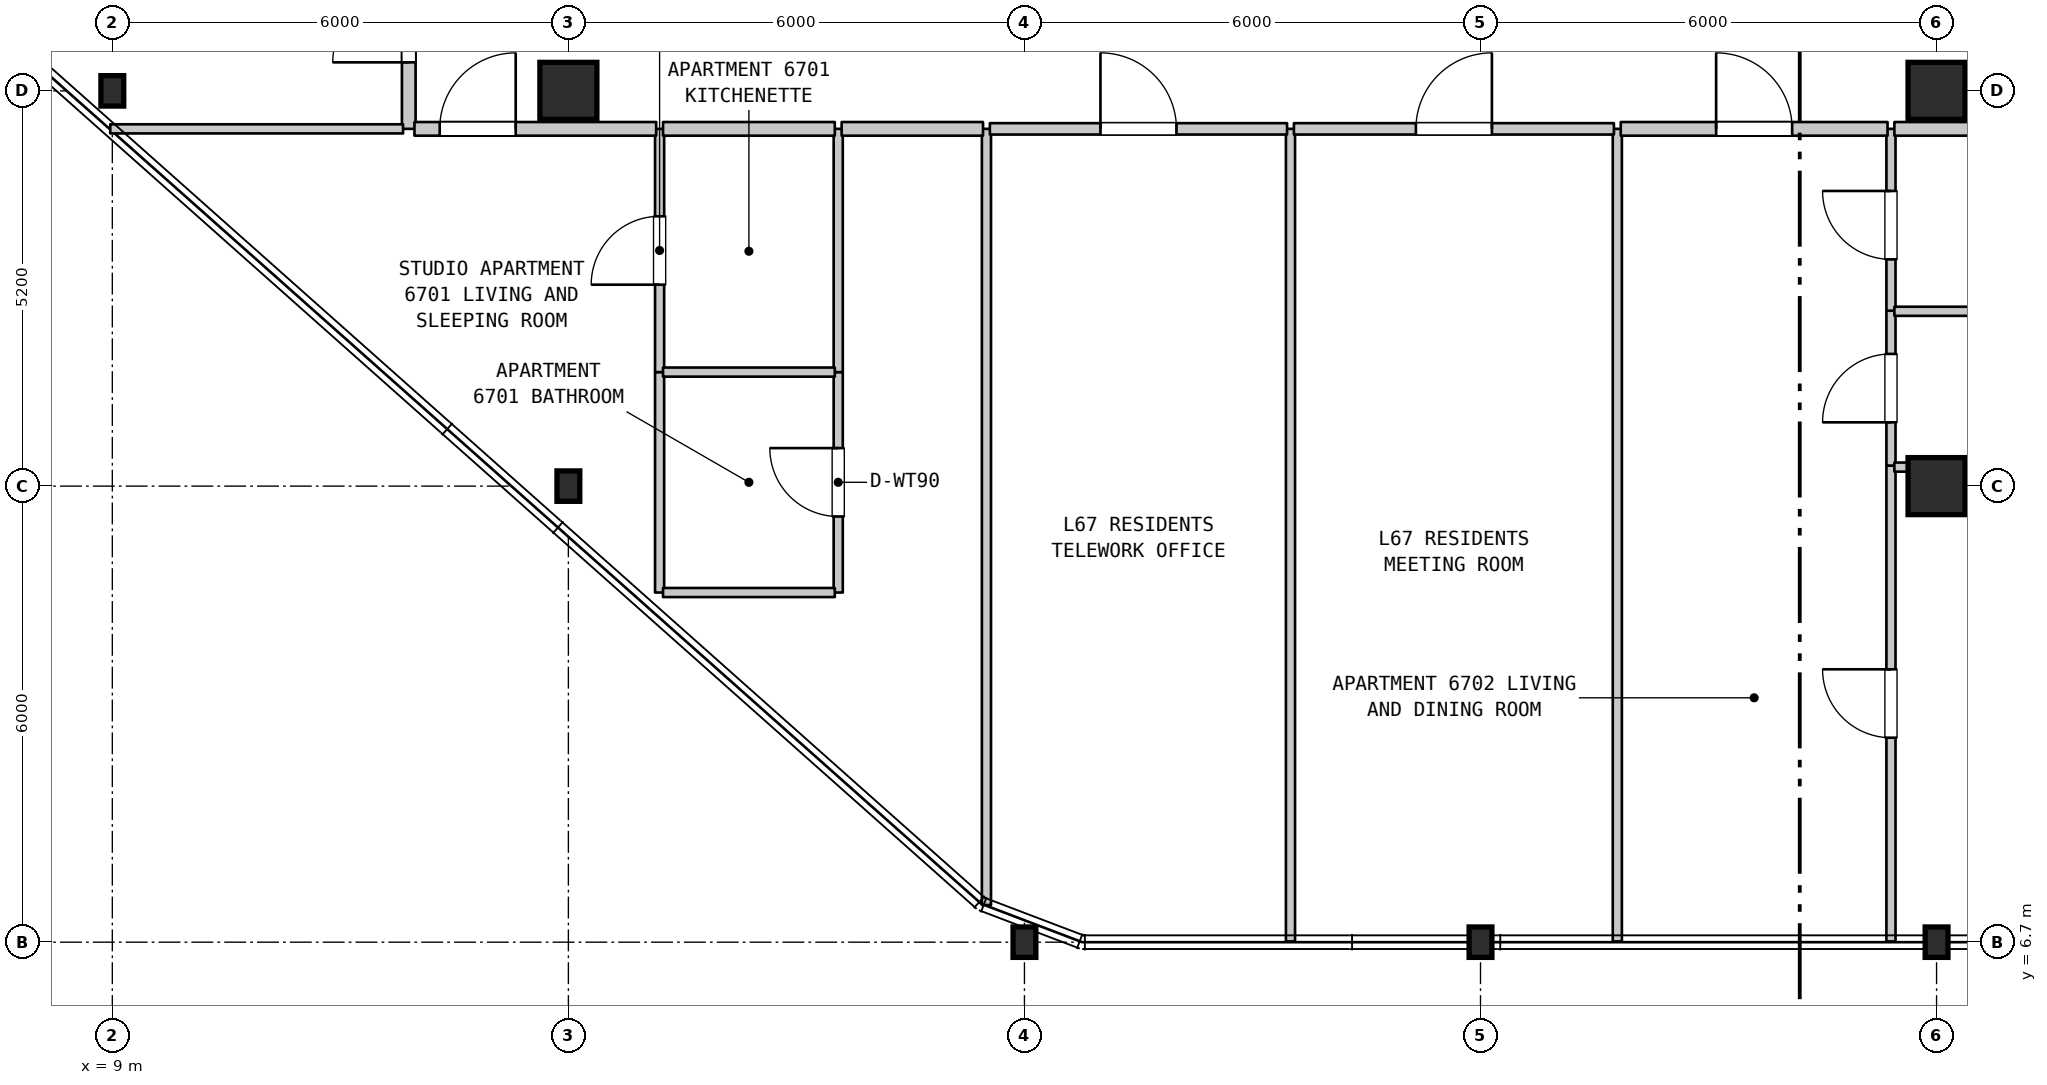
"""IFC4 building model, lengths in metres.
Left out: names, types, materials, properties, quantities, classifications, styles, units other than length and angle.
Written with IfcOpenShell. Run it as: python <this file> out.ifc"""

import sys

from ifc_helpers import new_model, si_unit, direction, frame, frame_2d, origin, origin_2d, place, context, subcontext, project, spatial, rectangle, i_section, extrude, element, fill, save


model = new_model("IFC4")
c1 = context("Model", 3, precision=1e-05, world=origin(), true_north=direction((0.0, 1.0)))
c2 = subcontext(c1, "Body", "Model", "MODEL_VIEW")
j1 = project(units=[si_unit("LENGTHUNIT", "METRE"), si_unit("PLANEANGLEUNIT", "RADIAN")], contexts=[c1])
p1 = place(None, origin())
s1 = spatial("IfcSite", under=j1, at=p1, CompositionType="ELEMENT")
p2 = place(p1, origin())
s2 = spatial("IfcBuilding", under=s1, at=p2, CompositionType="ELEMENT")
p3 = place(p2, frame((0.0, 0.0, 269.5)))
s3 = spatial("IfcBuildingStorey", under=s2, at=p3, CompositionType="ELEMENT", Elevation=269.5)
for number, where, z_axis, x_axis in (
    (1, (9.0, 17.9, 0.0), (0.0, 0.0, 1.0), (1.0, 0.0, 0.0)),
    (2, (15.0, 12.7, 0.0), (0.0, 0.0, 1.0), (1.0, 0.0, 0.0)),
):
    element("IfcColumn", number, at=place(p3, frame(where, z_axis=z_axis, x_axis=x_axis)), inside=s3, PredefinedType="COLUMN", context=c2, shape_type="SweptSolid", body=[
        extrude(i_section(OverallWidth=0.3, OverallDepth=0.4, WebThickness=0.013, FlangeThickness=0.024, FilletRadius=0.027, at=origin_2d()), origin(), (0.0, 0.0, 1.0), 3.7),
    ])
p4 = place(p3, frame((15.0, 17.9, 0.0), z_axis=(0.0, 0.0, 1.0), x_axis=(1.0, 0.0, 0.0)))
e3 = element("IfcColumn", 3, at=p4, inside=s3, PredefinedType="COLUMN", context=c2, shape_type="SweptSolid", body=[
    extrude(rectangle(XDim=0.75, YDim=0.75, at=origin_2d()), origin(), (0.0, 0.0, 1.0), 3.7),
])
for number, where, z_axis, x_axis in (
    (4, (21.0, 6.7, 0.0), (0.0, 0.0, 1.0), (1.0, 0.0, 0.0)),
    (5, (27.0, 6.7, 0.0), (0.0, 0.0, 1.0), (1.0, 0.0, 0.0)),
    (6, (33.0, 6.7, 0.0), (0.0, 0.0, 1.0), (1.0, 0.0, 0.0)),
):
    element("IfcColumn", number, at=place(p3, frame(where, z_axis=z_axis, x_axis=x_axis)), inside=s3, PredefinedType="COLUMN", context=c2, shape_type="SweptSolid", body=[
        extrude(i_section(OverallWidth=0.3, OverallDepth=0.4, WebThickness=0.013, FlangeThickness=0.024, FilletRadius=0.027, at=origin_2d()), origin(), (0.0, 0.0, 1.0), 3.7),
    ])
for number, where, z_axis, x_axis in (
    (7, (33.0, 12.7, 0.0), (0.0, 0.0, 1.0), (1.0, 0.0, 0.0)),
    (8, (33.0, 17.9, 0.0), (0.0, 0.0, 1.0), (1.0, 0.0, 0.0)),
):
    element("IfcColumn", number, at=place(p3, frame(where, z_axis=z_axis, x_axis=x_axis)), inside=s3, PredefinedType="COLUMN", context=c2, shape_type="SweptSolid", body=[
        extrude(rectangle(XDim=0.75, YDim=0.75, at=origin_2d()), origin(), (0.0, 0.0, 1.0), 3.7),
    ])
p5 = place(p3, frame((12.9, 17.4, 0.0), z_axis=(0.0, 0.0, 1.0), x_axis=(0.0, 1.0, 0.0)))
e9 = element("IfcWall", 9, at=p5, inside=s3, PredefinedType="STANDARD", context=c2, shape_type="SweptSolid", body=[
    extrude(rectangle(XDim=2.75, YDim=0.18, at=frame_2d((1.375, 0.0))), origin(), (0.0, 0.0, 1.0), 3.39),
])
p6 = place(p5, frame((0.875, 0.0, 0.0)))
e10 = element("IfcOpeningElement", 10, at=p6, cuts=e9, PredefinedType="OPENING", context=c2, shape_type="SweptSolid", body=[
    extrude(rectangle(XDim=1.0, YDim=2.15, at=frame_2d((0.5, 1.075))), frame((0.0, 0.1, 0.0), z_axis=(0.0, -1.0, 0.0), x_axis=(1.0, 0.0, 0.0)), (0.0, 0.0, 1.0), 0.2),
])
p7 = place(p3, frame((16.2, 11.3, 0.0), z_axis=(0.0, 0.0, 1.0), x_axis=(0.0, 1.0, 0.0)))
e11 = element("IfcWall", 11, at=p7, inside=s3, PredefinedType="PARTITIONING", context=c2, shape_type="SweptSolid", body=[
    extrude(rectangle(XDim=2.9, YDim=0.12, at=frame_2d((1.45, 0.0))), origin(), (0.0, 0.0, 1.0), 3.39),
])
p8 = place(p3, frame((16.2, 14.2, 0.0), z_axis=(0.0, 0.0, 1.0), x_axis=(0.0, 1.0, 0.0)))
e12 = element("IfcWall", 12, at=p8, inside=s3, PredefinedType="PARTITIONING", context=c2, shape_type="SweptSolid", body=[
    extrude(rectangle(XDim=3.2, YDim=0.12, at=frame_2d((1.6, 0.0))), origin(), (0.0, 0.0, 1.0), 3.39),
])
p9 = place(p8, frame((1.15, 0.0, 0.0)))
e13 = element("IfcOpeningElement", 13, at=p9, cuts=e12, PredefinedType="OPENING", context=c2, shape_type="SweptSolid", body=[
    extrude(rectangle(XDim=0.9, YDim=2.15, at=frame_2d((0.45, 1.075))), frame((0.0, 0.07, 0.0), z_axis=(0.0, -1.0, 0.0), x_axis=(1.0, 0.0, 0.0)), (0.0, 0.0, 1.0), 0.14),
])
p10 = place(p3, frame((18.55, 11.3, 0.0), z_axis=(0.0, 0.0, 1.0), x_axis=(0.0, 1.0, 0.0)))
e14 = element("IfcWall", 14, at=p10, inside=s3, PredefinedType="PARTITIONING", context=c2, shape_type="SweptSolid", body=[
    extrude(rectangle(XDim=2.9, YDim=0.12, at=frame_2d((1.45, 0.0))), origin(), (0.0, 0.0, 1.0), 3.39),
])
p11 = place(p10, frame((1.0, 0.0, 0.0)))
e15 = element("IfcOpeningElement", 15, at=p11, cuts=e14, PredefinedType="OPENING", context=c2, shape_type="SweptSolid", body=[
    extrude(rectangle(XDim=0.9, YDim=2.1, at=frame_2d((0.45, 1.05))), frame((0.0, 0.07, 0.0), z_axis=(0.0, -1.0, 0.0), x_axis=(1.0, 0.0, 0.0)), (0.0, 0.0, 1.0), 0.14),
])
p12 = place(p3, frame((18.55, 14.2, 0.0), z_axis=(0.0, 0.0, 1.0), x_axis=(0.0, 1.0, 0.0)))
e16 = element("IfcWall", 16, at=p12, inside=s3, PredefinedType="PARTITIONING", context=c2, shape_type="SweptSolid", body=[
    extrude(rectangle(XDim=3.2, YDim=0.12, at=frame_2d((1.6, 0.0))), origin(), (0.0, 0.0, 1.0), 3.39),
])
p13 = place(p3, frame((20.5, 7.189, 0.0), z_axis=(0.0, 0.0, 1.0), x_axis=(0.0, 1.0, 0.0)))
e17 = element("IfcWall", 17, at=p13, inside=s3, PredefinedType="PARTITIONING", context=c2, shape_type="SweptSolid", body=[
    extrude(rectangle(XDim=10.211, YDim=0.12, at=frame_2d((5.105, 0.0))), origin(), (0.0, 0.0, 1.0), 3.39),
])
for number, where, z_axis, x_axis in (
    (18, (24.5, 6.71, 0.0), (0.0, 0.0, 1.0), (0.0, 1.0, 0.0)),
    (19, (28.8, 6.71, 0.0), (0.0, 0.0, 1.0), (0.0, 1.0, 0.0)),
):
    element("IfcWall", number, at=place(p3, frame(where, z_axis=z_axis, x_axis=x_axis)), inside=s3, PredefinedType="PARTITIONING", context=c2, shape_type="SweptSolid", body=[
        extrude(rectangle(XDim=10.69, YDim=0.12, at=frame_2d((5.345, 0.0))), origin(), (0.0, 0.0, 1.0), 3.39),
    ])
p14 = place(p3, frame((32.4, 6.71, 0.0), z_axis=(0.0, 0.0, 1.0), x_axis=(0.0, 1.0, 0.0)))
e20 = element("IfcWall", 20, at=p14, inside=s3, PredefinedType="PARTITIONING", context=c2, shape_type="SweptSolid", body=[
    extrude(rectangle(XDim=6.26, YDim=0.12, at=frame_2d((3.13, 0.0))), origin(), (0.0, 0.0, 1.0), 3.39),
])
p15 = place(p14, frame((2.68, 0.0, 0.0)))
e21 = element("IfcOpeningElement", 21, at=p15, cuts=e20, PredefinedType="OPENING", context=c2, shape_type="SweptSolid", body=[
    extrude(rectangle(XDim=0.9, YDim=2.15, at=frame_2d((0.45, 1.075))), frame((0.0, 0.07, 0.0), z_axis=(0.0, -1.0, 0.0), x_axis=(1.0, 0.0, 0.0)), (0.0, 0.0, 1.0), 0.14),
])
p16 = place(p3, frame((32.4, 12.97, 0.0), z_axis=(0.0, 0.0, 1.0), x_axis=(0.0, 1.0, 0.0)))
e22 = element("IfcWall", 22, at=p16, inside=s3, PredefinedType="PARTITIONING", context=c2, shape_type="SweptSolid", body=[
    extrude(rectangle(XDim=2.038, YDim=0.12, at=frame_2d((1.019, 0.0))), origin(), (0.0, 0.0, 1.0), 3.39),
])
p17 = place(p16, frame((0.569, 0.0, 0.0)))
e23 = element("IfcOpeningElement", 23, at=p17, cuts=e22, PredefinedType="OPENING", context=c2, shape_type="SweptSolid", body=[
    extrude(rectangle(XDim=0.9, YDim=2.15, at=frame_2d((0.45, 1.075))), frame((0.0, 0.07, 0.0), z_axis=(0.0, -1.0, 0.0), x_axis=(1.0, 0.0, 0.0)), (0.0, 0.0, 1.0), 0.14),
])
p18 = place(p3, frame((32.4, 15.008, 0.0), z_axis=(0.0, 0.0, 1.0), x_axis=(0.0, 1.0, 0.0)))
e24 = element("IfcWall", 24, at=p18, inside=s3, PredefinedType="PARTITIONING", context=c2, shape_type="SweptSolid", body=[
    extrude(rectangle(XDim=2.392, YDim=0.12, at=frame_2d((1.196, 0.0))), origin(), (0.0, 0.0, 1.0), 3.39),
])
p19 = place(p18, frame((0.675, 0.0, 0.0)))
e25 = element("IfcOpeningElement", 25, at=p19, cuts=e24, PredefinedType="OPENING", context=c2, shape_type="SweptSolid", body=[
    extrude(rectangle(XDim=0.9, YDim=2.1, at=frame_2d((0.45, 1.05))), frame((0.0, 0.07, 0.0), z_axis=(0.0, -1.0, 0.0), x_axis=(1.0, 0.0, 0.0)), (0.0, 0.0, 1.0), 0.14),
])
p20 = place(p3, frame((16.245, 11.3, 0.0), z_axis=(0.0, 0.0, 1.0), x_axis=(1.0, 0.0, 0.0)))
e26 = element("IfcWall", 26, at=p20, inside=s3, PredefinedType="PARTITIONING", context=c2, shape_type="SweptSolid", body=[
    extrude(rectangle(XDim=2.26, YDim=0.12, at=frame_2d((1.13, 0.0))), origin(), (0.0, 0.0, 1.0), 3.39),
])
p21 = place(p3, frame((32.445, 12.95, 0.0), z_axis=(0.0, 0.0, 1.0), x_axis=(1.0, 0.0, 0.0)))
e27 = element("IfcWall", 27, at=p21, inside=s3, PredefinedType="PARTITIONING", context=c2, shape_type="SweptSolid", body=[
    extrude(rectangle(XDim=4.46, YDim=0.12, at=frame_2d((2.23, 0.0))), origin(), (0.0, 0.0, 1.0), 3.39),
])
p22 = place(p3, frame((16.245, 14.2, 0.0), z_axis=(0.0, 0.0, 1.0), x_axis=(1.0, 0.0, 0.0)))
e28 = element("IfcWall", 28, at=p22, inside=s3, PredefinedType="PARTITIONING", context=c2, shape_type="SweptSolid", body=[
    extrude(rectangle(XDim=2.26, YDim=0.12, at=frame_2d((1.13, 0.0))), origin(), (0.0, 0.0, 1.0), 3.39),
])
p23 = place(p3, frame((32.445, 15.0, 0.0), z_axis=(0.0, 0.0, 1.0), x_axis=(1.0, 0.0, 0.0)))
e29 = element("IfcWall", 29, at=p23, inside=s3, PredefinedType="PARTITIONING", context=c2, shape_type="SweptSolid", body=[
    extrude(rectangle(XDim=4.46, YDim=0.12, at=frame_2d((2.23, 0.0))), origin(), (0.0, 0.0, 1.0), 3.39),
])
p24 = place(p3, frame((8.973, 17.4, 0.0), z_axis=(0.0, 0.0, 1.0), x_axis=(1.0, 0.0, 0.0)))
e30 = element("IfcWall", 30, at=p24, inside=s3, PredefinedType="PARTITIONING", context=c2, shape_type="SweptSolid", body=[
    extrude(rectangle(XDim=3.852, YDim=0.12, at=frame_2d((1.926, 0.0))), origin(), (0.0, 0.0, 1.0), 3.39),
])
p25 = place(p3, frame((12.975, 17.4, 0.0), z_axis=(0.0, 0.0, 1.0), x_axis=(1.0, 0.0, 0.0)))
e31 = element("IfcWall", 31, at=p25, inside=s3, PredefinedType="STANDARD", context=c2, shape_type="SweptSolid", body=[
    extrude(rectangle(XDim=3.18, YDim=0.18, at=frame_2d((1.59, 0.0))), origin(), (0.0, 0.0, 1.0), 3.39),
])
p26 = place(p25, frame((0.332, 0.0, 0.0)))
e32 = element("IfcOpeningElement", 32, at=p26, cuts=e31, PredefinedType="OPENING", context=c2, shape_type="SweptSolid", body=[
    extrude(rectangle(XDim=1.0, YDim=2.15, at=frame_2d((0.5, 1.075))), frame((0.0, 0.1, 0.0), z_axis=(0.0, -1.0, 0.0), x_axis=(1.0, 0.0, 0.0)), (0.0, 0.0, 1.0), 0.2),
])
p27 = place(p3, frame((16.245, 17.4, 0.0), z_axis=(0.0, 0.0, 1.0), x_axis=(1.0, 0.0, 0.0)))
e33 = element("IfcWall", 33, at=p27, inside=s3, PredefinedType="STANDARD", context=c2, shape_type="SweptSolid", body=[
    extrude(rectangle(XDim=2.26, YDim=0.18, at=frame_2d((1.13, 0.0))), origin(), (0.0, 0.0, 1.0), 3.39),
])
p28 = place(p3, frame((18.595, 17.4, 0.0), z_axis=(0.0, 0.0, 1.0), x_axis=(1.0, 0.0, 0.0)))
e34 = element("IfcWall", 34, at=p28, inside=s3, PredefinedType="STANDARD", context=c2, shape_type="SweptSolid", body=[
    extrude(rectangle(XDim=1.86, YDim=0.18, at=frame_2d((0.93, 0.0))), origin(), (0.0, 0.0, 1.0), 3.39),
])
p29 = place(p3, frame((20.545, 17.4, 0.0), z_axis=(0.0, 0.0, 1.0), x_axis=(1.0, 0.0, 0.0)))
e35 = element("IfcWall", 35, at=p29, inside=s3, PredefinedType="STANDARD", context=c2, shape_type="SweptSolid", body=[
    extrude(rectangle(XDim=3.91, YDim=0.15, at=frame_2d((1.955, 0.0))), origin(), (0.0, 0.0, 1.0), 3.39),
])
p30 = place(p29, frame((1.455, 0.0, 0.0)))
e36 = element("IfcOpeningElement", 36, at=p30, cuts=e35, PredefinedType="OPENING", context=c2, shape_type="SweptSolid", body=[
    extrude(rectangle(XDim=1.0, YDim=2.15, at=frame_2d((0.5, 1.075))), frame((0.0, 0.085, 0.0), z_axis=(0.0, -1.0, 0.0), x_axis=(1.0, 0.0, 0.0)), (0.0, 0.0, 1.0), 0.17),
])
p31 = place(p3, frame((24.545, 17.4, 0.0), z_axis=(0.0, 0.0, 1.0), x_axis=(1.0, 0.0, 0.0)))
e37 = element("IfcWall", 37, at=p31, inside=s3, PredefinedType="STANDARD", context=c2, shape_type="SweptSolid", body=[
    extrude(rectangle(XDim=4.21, YDim=0.15, at=frame_2d((2.105, 0.0))), origin(), (0.0, 0.0, 1.0), 3.39),
])
p32 = place(p31, frame((1.605, 0.0, 0.0)))
e38 = element("IfcOpeningElement", 38, at=p32, cuts=e37, PredefinedType="OPENING", context=c2, shape_type="SweptSolid", body=[
    extrude(rectangle(XDim=1.0, YDim=2.15, at=frame_2d((0.5, 1.075))), frame((0.0, 0.085, 0.0), z_axis=(0.0, -1.0, 0.0), x_axis=(1.0, 0.0, 0.0)), (0.0, 0.0, 1.0), 0.17),
])
p33 = place(p3, frame((28.845, 17.4, 0.0), z_axis=(0.0, 0.0, 1.0), x_axis=(1.0, 0.0, 0.0)))
e39 = element("IfcWall", 39, at=p33, inside=s3, PredefinedType="STANDARD", context=c2, shape_type="SweptSolid", body=[
    extrude(rectangle(XDim=3.51, YDim=0.18, at=frame_2d((1.755, 0.0))), origin(), (0.0, 0.0, 1.0), 3.39),
])
p34 = place(p33, frame((1.255, 0.0, 0.0)))
e40 = element("IfcOpeningElement", 40, at=p34, cuts=e39, PredefinedType="OPENING", context=c2, shape_type="SweptSolid", body=[
    extrude(rectangle(XDim=1.0, YDim=2.15, at=frame_2d((0.5, 1.075))), frame((0.0, 0.1, 0.0), z_axis=(0.0, -1.0, 0.0), x_axis=(1.0, 0.0, 0.0)), (0.0, 0.0, 1.0), 0.2),
])
p35 = place(p3, frame((32.445, 17.4, 0.0), z_axis=(0.0, 0.0, 1.0), x_axis=(1.0, 0.0, 0.0)))
e41 = element("IfcWall", 41, at=p35, inside=s3, PredefinedType="STANDARD", context=c2, shape_type="SweptSolid", body=[
    extrude(rectangle(XDim=4.46, YDim=0.18, at=frame_2d((2.23, 0.0))), origin(), (0.0, 0.0, 1.0), 3.39),
])
p36 = place(p6, origin())
e42 = element("IfcDoor", 42, at=p36, inside=s3, OperationType="SINGLE_SWING_LEFT", PredefinedType="DOOR", context=c2, shape_type="SweptSolid", body=[
    extrude(rectangle(XDim=1.0, YDim=2.15, at=frame_2d((0.5, 1.075))), frame((0.0, 0.025, 0.0), z_axis=(0.0, -1.0, 0.0), x_axis=(1.0, 0.0, 0.0)), (0.0, 0.0, 1.0), 0.05),
])
fill(e10, e42)
p37 = place(p9, origin())
e43 = element("IfcDoor", 43, at=p37, inside=s3, OperationType="SINGLE_SWING_LEFT", PredefinedType="DOOR", context=c2, shape_type="SweptSolid", body=[
    extrude(rectangle(XDim=0.9, YDim=2.15, at=frame_2d((0.45, 1.075))), frame((0.0, 0.025, 0.0), z_axis=(0.0, -1.0, 0.0), x_axis=(1.0, 0.0, 0.0)), (0.0, 0.0, 1.0), 0.05),
])
fill(e13, e43)
p38 = place(p11, origin())
e44 = element("IfcDoor", 44, at=p38, inside=s3, OperationType="SINGLE_SWING_RIGHT", PredefinedType="DOOR", context=c2, shape_type="SweptSolid", body=[
    extrude(rectangle(XDim=0.9, YDim=2.1, at=frame_2d((0.45, 1.05))), frame((0.0, 0.025, 0.0), z_axis=(0.0, -1.0, 0.0), x_axis=(1.0, 0.0, 0.0)), (0.0, 0.0, 1.0), 0.05),
])
fill(e15, e44)
p39 = place(p15, origin())
e45 = element("IfcDoor", 45, at=p39, inside=s3, OperationType="SINGLE_SWING_RIGHT", PredefinedType="DOOR", context=c2, shape_type="SweptSolid", body=[
    extrude(rectangle(XDim=0.9, YDim=2.15, at=frame_2d((0.45, 1.075))), frame((0.0, 0.025, 0.0), z_axis=(0.0, -1.0, 0.0), x_axis=(1.0, 0.0, 0.0)), (0.0, 0.0, 1.0), 0.05),
])
fill(e21, e45)
p40 = place(p17, origin())
e46 = element("IfcDoor", 46, at=p40, inside=s3, OperationType="SINGLE_SWING_LEFT", PredefinedType="DOOR", context=c2, shape_type="SweptSolid", body=[
    extrude(rectangle(XDim=0.9, YDim=2.15, at=frame_2d((0.45, 1.075))), frame((0.0, 0.025, 0.0), z_axis=(0.0, -1.0, 0.0), x_axis=(1.0, 0.0, 0.0)), (0.0, 0.0, 1.0), 0.05),
])
fill(e23, e46)
p41 = place(p19, origin())
e47 = element("IfcDoor", 47, at=p41, inside=s3, OperationType="SINGLE_SWING_RIGHT", PredefinedType="DOOR", context=c2, shape_type="SweptSolid", body=[
    extrude(rectangle(XDim=0.9, YDim=2.1, at=frame_2d((0.45, 1.05))), frame((0.0, 0.025, 0.0), z_axis=(0.0, -1.0, 0.0), x_axis=(1.0, 0.0, 0.0)), (0.0, 0.0, 1.0), 0.05),
])
fill(e25, e47)
p42 = place(p26, origin())
e48 = element("IfcDoor", 48, at=p42, inside=s3, OperationType="SINGLE_SWING_RIGHT", PredefinedType="DOOR", context=c2, shape_type="SweptSolid", body=[
    extrude(rectangle(XDim=1.0, YDim=2.15, at=frame_2d((0.5, 1.075))), frame((0.0, 0.025, 0.0), z_axis=(0.0, -1.0, 0.0), x_axis=(1.0, 0.0, 0.0)), (0.0, 0.0, 1.0), 0.05),
])
fill(e32, e48)
p43 = place(p30, origin())
e49 = element("IfcDoor", 49, at=p43, inside=s3, OperationType="SINGLE_SWING_LEFT", PredefinedType="DOOR", context=c2, shape_type="SweptSolid", body=[
    extrude(rectangle(XDim=1.0, YDim=2.15, at=frame_2d((0.5, 1.075))), frame((0.0, 0.025, 0.0), z_axis=(0.0, -1.0, 0.0), x_axis=(1.0, 0.0, 0.0)), (0.0, 0.0, 1.0), 0.05),
])
fill(e36, e49)
p44 = place(p32, origin())
e50 = element("IfcDoor", 50, at=p44, inside=s3, OperationType="SINGLE_SWING_RIGHT", PredefinedType="DOOR", context=c2, shape_type="SweptSolid", body=[
    extrude(rectangle(XDim=1.0, YDim=2.15, at=frame_2d((0.5, 1.075))), frame((0.0, 0.025, 0.0), z_axis=(0.0, -1.0, 0.0), x_axis=(1.0, 0.0, 0.0)), (0.0, 0.0, 1.0), 0.05),
])
fill(e38, e50)
p45 = place(p34, origin())
e51 = element("IfcDoor", 51, at=p45, inside=s3, OperationType="SINGLE_SWING_LEFT", PredefinedType="DOOR", context=c2, shape_type="SweptSolid", body=[
    extrude(rectangle(XDim=1.0, YDim=2.15, at=frame_2d((0.5, 1.075))), frame((0.0, 0.025, 0.0), z_axis=(0.0, -1.0, 0.0), x_axis=(1.0, 0.0, 0.0)), (0.0, 0.0, 1.0), 0.05),
])
fill(e40, e51)
save(model, sys.argv[1])
